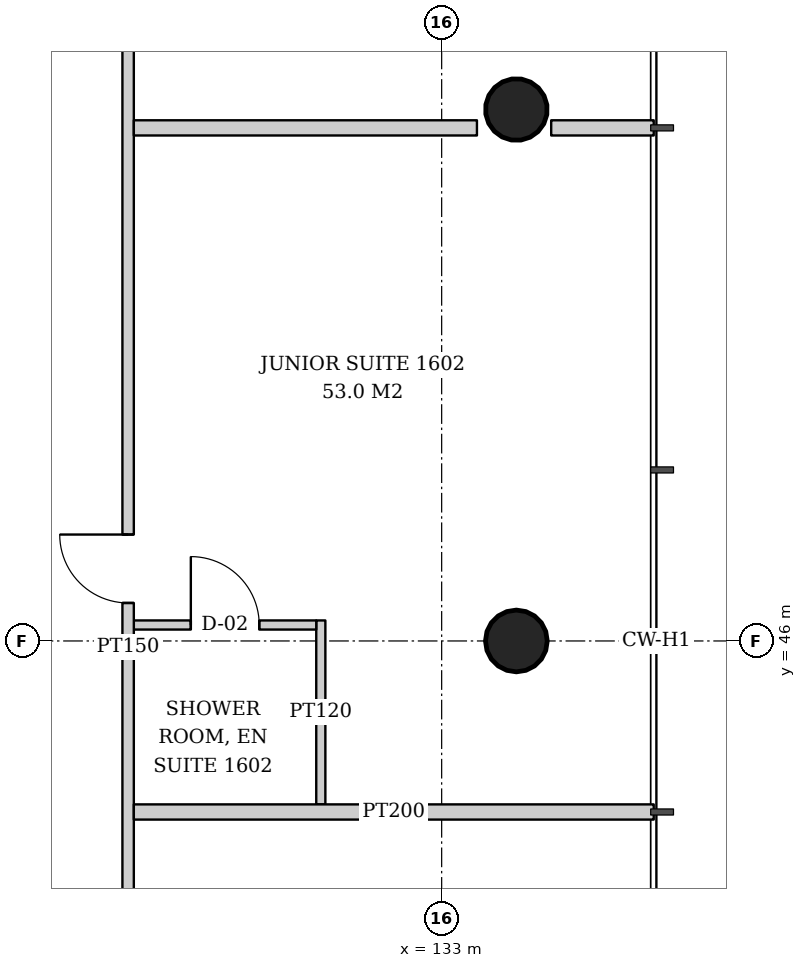
"""IFC4 building model, lengths in metres.
Left out: names, types, materials, properties, quantities, classifications, styles, units other than length and angle.
Written with IfcOpenShell. Run it as: python <this file> out.ifc"""

import sys

from ifc_helpers import new_model, si_unit, direction, frame, frame_2d, origin, origin_2d, place, context, subcontext, project, spatial, rectangle, hollow_circle, extrude, element, fill, save


model = new_model("IFC4")
c1 = context("Model", 3, precision=1e-05, world=origin(), true_north=direction((0.0, 1.0)))
c2 = subcontext(c1, "Body", "Model", "MODEL_VIEW")
j1 = project(units=[si_unit("LENGTHUNIT", "METRE"), si_unit("PLANEANGLEUNIT", "RADIAN")], contexts=[c1])
p1 = place(None, origin())
s1 = spatial("IfcSite", under=j1, at=p1, CompositionType="ELEMENT")
p2 = place(p1, origin())
s2 = spatial("IfcBuilding", under=s1, at=p2, CompositionType="ELEMENT")
p3 = place(p2, frame((0.0, 0.0, 66.6)))
s3 = spatial("IfcBuildingStorey", under=s2, at=p3, CompositionType="ELEMENT", Elevation=66.6)
p4 = place(p3, frame((134.034, 46.0, 0.0), z_axis=(-0.043072300418, 0.0, 0.999071957837), x_axis=(0.0, -1.0, 0.0)))
e1 = element("IfcColumn", 1, at=p4, inside=s3, PredefinedType="COLUMN", context=c2, shape_type="SweptSolid", body=[
    extrude(hollow_circle(Radius=0.406, WallThickness=0.03, at=origin_2d()), origin(), (0.0, 0.0, 1.0), 3.803),
])
p5 = place(p3, frame((134.034, 53.017, 0.0), z_axis=(-0.043062285527, -0.021563230905, 0.998839660125), x_axis=(0.44774654769, -0.894160516368, 0.0)))
e2 = element("IfcColumn", 2, at=p5, inside=s3, PredefinedType="COLUMN", context=c2, shape_type="SweptSolid", body=[
    extrude(hollow_circle(Radius=0.406, WallThickness=0.03, at=origin_2d()), origin(), (0.0, 0.0, 1.0), 3.804),
])
p6 = place(p3, frame((131.41, 43.85, 0.0), z_axis=(0.0, 0.0, 1.0), x_axis=(0.0, 1.0, 0.0)))
e3 = element("IfcWall", 3, at=p6, inside=s3, PredefinedType="PARTITIONING", context=c2, shape_type="SweptSolid", body=[
    extrude(rectangle(XDim=2.42, YDim=0.12, at=frame_2d((1.21, 0.0))), origin(), (0.0, 0.0, 1.0), 2.847),
])
p7 = place(p3, frame((128.95, 46.21, 0.0), z_axis=(0.0, 0.0, 1.0), x_axis=(1.0, 0.0, 0.0)))
e4 = element("IfcWall", 4, at=p7, inside=s3, PredefinedType="PARTITIONING", context=c2, shape_type="SweptSolid", body=[
    extrude(rectangle(XDim=2.4, YDim=0.12, at=frame_2d((1.2, 0.0))), origin(), (0.0, 0.0, 1.0), 3.6),
])
p8 = place(p7, frame((0.75, 0.0, 0.0)))
e5 = element("IfcOpeningElement", 5, at=p8, cuts=e4, PredefinedType="OPENING", context=c2, shape_type="SweptSolid", body=[
    extrude(rectangle(XDim=0.9, YDim=2.1, at=frame_2d((0.45, 1.05))), frame((0.0, 0.07, 0.0), z_axis=(0.0, -1.0, 0.0), x_axis=(1.0, 0.0, 0.0)), (0.0, 0.0, 1.0), 0.14),
])
p9 = place(p3, frame((128.875, 34.05, 0.0), z_axis=(0.0, 0.0, 1.0), x_axis=(0.0, 1.0, 0.0)))
e6 = element("IfcWall", 6, at=p9, inside=s3, PredefinedType="PARTITIONING", context=c2, shape_type="SweptSolid", body=[
    extrude(rectangle(XDim=23.75, YDim=0.15, at=frame_2d((11.875, 0.0))), origin(), (0.0, 0.0, 1.0), 2.8),
])
p10 = place(p9, frame((2.175, 0.0, 0.0)))
e7 = element("IfcOpeningElement", 7, at=p10, cuts=e6, PredefinedType="OPENING", context=c2, shape_type="SweptSolid", body=[
    extrude(rectangle(XDim=0.9, YDim=2.1, at=frame_2d((0.45, 1.05))), frame((0.0, 0.085, 0.0), z_axis=(0.0, -1.0, 0.0), x_axis=(1.0, 0.0, 0.0)), (0.0, 0.0, 1.0), 0.17),
])
p11 = place(p9, frame((12.45, 0.0, 0.0)))
e8 = element("IfcOpeningElement", 8, at=p11, cuts=e6, PredefinedType="OPENING", context=c2, shape_type="SweptSolid", body=[
    extrude(rectangle(XDim=0.9, YDim=2.1, at=frame_2d((0.45, 1.05))), frame((0.0, 0.085, 0.0), z_axis=(0.0, -1.0, 0.0), x_axis=(1.0, 0.0, 0.0)), (0.0, 0.0, 1.0), 0.17),
])
p12 = place(p3, frame((128.95, 43.75, 0.0), z_axis=(0.0, 0.0, 1.0), x_axis=(1.0, 0.0, 0.0)))
e9 = element("IfcWall", 9, at=p12, inside=s3, PredefinedType="PARTITIONING", context=c2, shape_type="SweptSolid", body=[
    extrude(rectangle(XDim=6.84, YDim=0.2, at=frame_2d((3.42, 0.0))), origin(), (0.0, 0.0, 1.0), 3.05),
])
p13 = place(p3, frame((128.95, 52.75, 0.0), z_axis=(0.0, 0.0, 1.0), x_axis=(1.0, 0.0, 0.0)))
e10 = element("IfcWall", 10, at=p13, inside=s3, PredefinedType="PARTITIONING", context=c2, shape_type="SweptSolid", body=[
    extrude(rectangle(XDim=4.514, YDim=0.2, at=frame_2d((2.257, 0.0))), origin(), (0.0, 0.0, 1.0), 3.6),
])
p14 = place(p3, frame((134.441, 52.75, 0.0), z_axis=(0.0, 0.0, 1.0), x_axis=(1.0, 0.0, 0.0)))
e11 = element("IfcWall", 11, at=p14, inside=s3, PredefinedType="PARTITIONING", context=c2, shape_type="SweptSolid", body=[
    extrude(rectangle(XDim=1.349, YDim=0.2, at=frame_2d((0.675, 0.0))), origin(), (0.0, 0.0, 1.0), 3.6),
])
p15 = place(p8, origin())
e12 = element("IfcDoor", 12, at=p15, inside=s3, OperationType="SINGLE_SWING_LEFT", PredefinedType="DOOR", context=c2, shape_type="SweptSolid", body=[
    extrude(rectangle(XDim=0.9, YDim=2.1, at=frame_2d((0.45, 1.05))), frame((0.0, 0.025, 0.0), z_axis=(0.0, -1.0, 0.0), x_axis=(1.0, 0.0, 0.0)), (0.0, 0.0, 1.0), 0.05),
])
fill(e5, e12)
p16 = place(p11, origin())
e13 = element("IfcDoor", 13, at=p16, inside=s3, OperationType="SINGLE_SWING_RIGHT", PredefinedType="DOOR", context=c2, shape_type="SweptSolid", body=[
    extrude(rectangle(XDim=0.9, YDim=2.1, at=frame_2d((0.45, 1.05))), frame((0.0, 0.025, 0.0), z_axis=(0.0, -1.0, 0.0), x_axis=(1.0, 0.0, 0.0)), (0.0, 0.0, 1.0), 0.05),
])
fill(e8, e13)
save(model, sys.argv[1])
